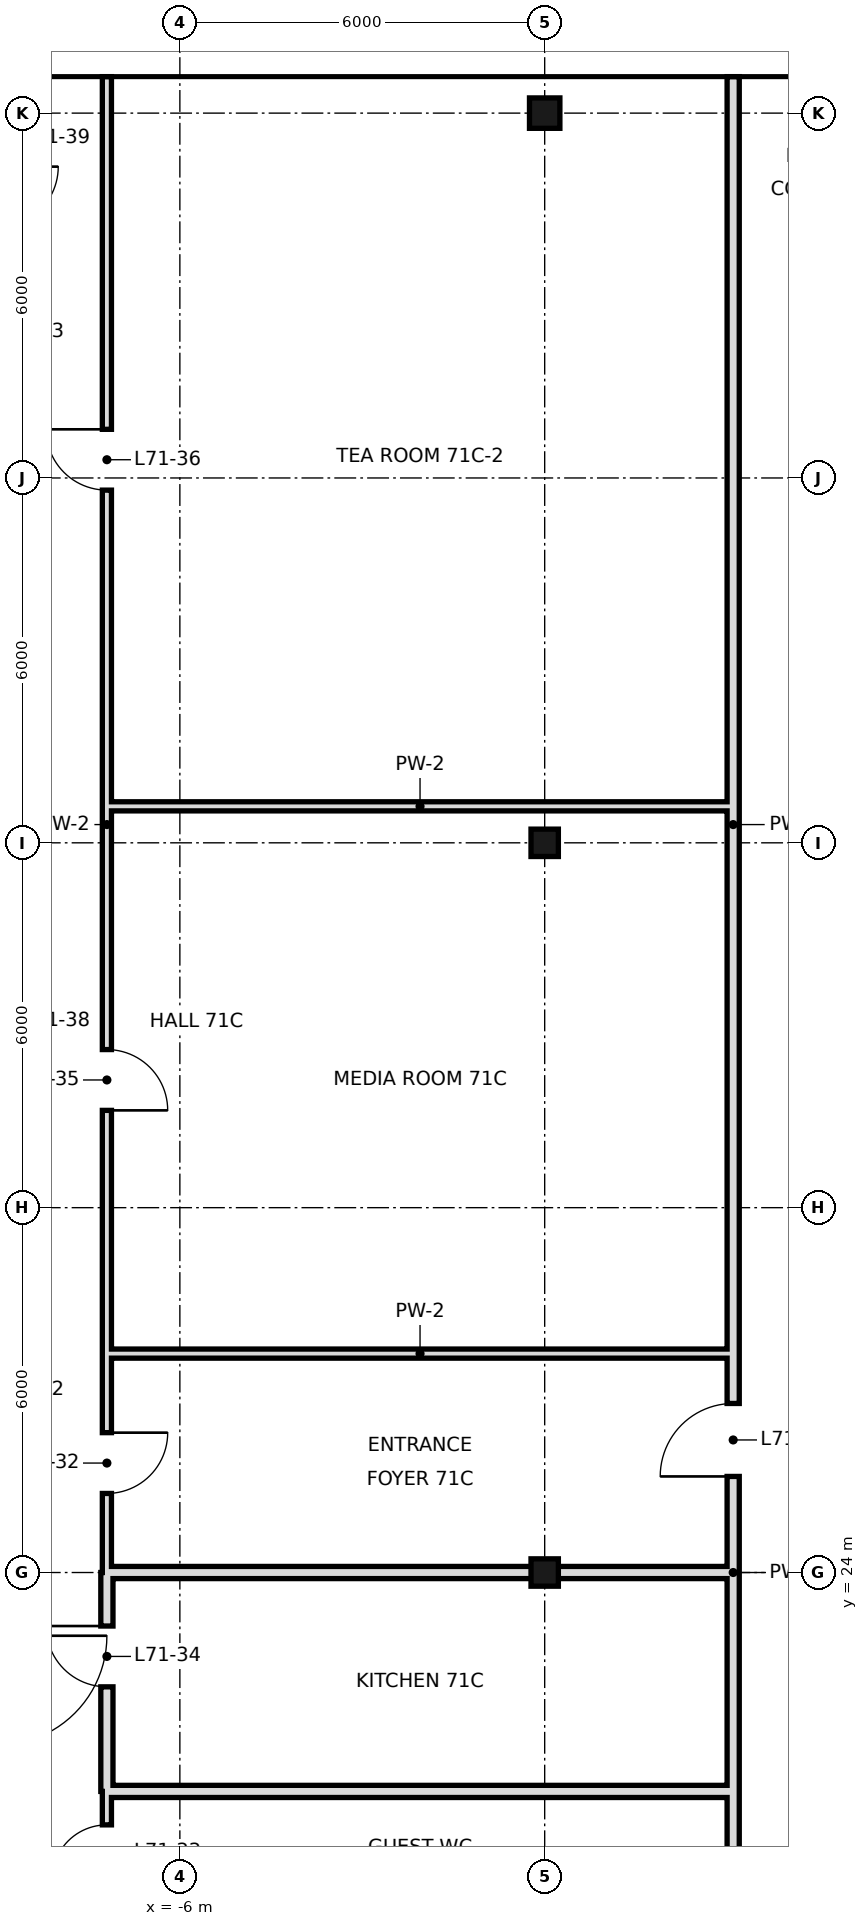
"""IFC4 building model, lengths in metres.
Left out: names, types, materials, properties, quantities, classifications, styles, units other than length and angle.
Written with IfcOpenShell. Run it as: python <this file> out.ifc"""

import sys

from ifc_helpers import new_model, si_unit, direction, frame, frame_2d, origin, origin_2d, place, context, subcontext, project, spatial, rectangle, hollow_rectangle, extrude, element, fill, save


model = new_model("IFC4")
c1 = context("Model", 3, precision=1e-05, world=origin(), true_north=direction((0.0, 1.0)))
c2 = subcontext(c1, "Body", "Model", "MODEL_VIEW")
j1 = project(units=[si_unit("LENGTHUNIT", "METRE"), si_unit("PLANEANGLEUNIT", "RADIAN")], contexts=[c1])
p1 = place(None, origin())
s1 = spatial("IfcSite", under=j1, at=p1, CompositionType="ELEMENT")
p2 = place(p1, origin())
s2 = spatial("IfcBuilding", under=s1, at=p2, CompositionType="ELEMENT")
p3 = place(p2, frame((0.0, 0.0, 301.6)))
s3 = spatial("IfcBuildingStorey", under=s2, at=p3, CompositionType="ELEMENT", Elevation=301.6)
for number, where, z_axis, x_axis in (
    (1, (0.0, 24.0, 0.0), (0.0, 0.0, 1.0), (1.0, 0.0, 0.0)),
    (2, (0.0, 36.0, 0.0), (0.0, 0.0, 1.0), (1.0, 0.0, 0.0)),
):
    element("IfcColumn", number, at=place(p3, frame(where, z_axis=z_axis, x_axis=x_axis)), inside=s3, PredefinedType="COLUMN", context=c2, shape_type="SweptSolid", body=[
        extrude(hollow_rectangle(XDim=0.45, YDim=0.45, WallThickness=0.022, at=origin_2d()), origin(), (0.0, 0.0, 1.0), 3.6),
    ])
p4 = place(p3, frame((0.0, 48.0, 0.0), z_axis=(0.0, 0.0, 1.0), x_axis=(1.0, 0.0, 0.0)))
e3 = element("IfcColumn", 3, at=p4, inside=s3, PredefinedType="COLUMN", context=c2, shape_type="SweptSolid", body=[
    extrude(hollow_rectangle(XDim=0.5, YDim=0.5, WallThickness=0.025, at=origin_2d()), origin(), (0.0, 0.0, 1.0), 3.6),
])
p5 = place(p3, frame((-7.2, 20.4, 0.0), z_axis=(0.0, 0.0, 1.0), x_axis=(0.0, 1.0, 0.0)))
e4 = element("IfcWall", 4, at=p5, inside=s3, PredefinedType="SOLIDWALL", context=c2, shape_type="SweptSolid", body=[
    extrude(rectangle(XDim=3.6, YDim=0.2, at=frame_2d((1.8, 0.0))), origin(), (0.0, 0.0, 1.0), 2.72),
])
p6 = place(p5, frame((1.72, 0.0, 0.0)))
e5 = element("IfcOpeningElement", 5, at=p6, cuts=e4, PredefinedType="OPENING", context=c2, shape_type="SweptSolid", body=[
    extrude(rectangle(XDim=1.0, YDim=2.4, at=frame_2d((0.5, 1.2))), frame((0.0, 0.11, 0.0), z_axis=(0.0, -1.0, 0.0), x_axis=(1.0, 0.0, 0.0)), (0.0, 0.0, 1.0), 0.22),
])
p7 = place(p3, frame((-7.2, 24.0, 0.0), z_axis=(0.0, 0.0, 1.0), x_axis=(0.0, 1.0, 0.0)))
e6 = element("IfcWall", 6, at=p7, inside=s3, PredefinedType="PARTITIONING", context=c2, shape_type="SweptSolid", body=[
    extrude(rectangle(XDim=24.6, YDim=0.15, at=frame_2d((12.3, 0.0))), origin(), (0.0, 0.0, 1.0), 3.42),
])
p8 = place(p7, frame((1.3, 0.0, 0.0)))
e7 = element("IfcOpeningElement", 7, at=p8, cuts=e6, PredefinedType="OPENING", context=c2, shape_type="SweptSolid", body=[
    extrude(rectangle(XDim=1.0, YDim=2.4, at=frame_2d((0.5, 1.2))), frame((0.0, 0.085, 0.0), z_axis=(0.0, -1.0, 0.0), x_axis=(1.0, 0.0, 0.0)), (0.0, 0.0, 1.0), 0.17),
])
p9 = place(p7, frame((7.6, 0.0, 0.0)))
e8 = element("IfcOpeningElement", 8, at=p9, cuts=e6, PredefinedType="OPENING", context=c2, shape_type="SweptSolid", body=[
    extrude(rectangle(XDim=1.0, YDim=2.4, at=frame_2d((0.5, 1.2))), frame((0.0, 0.085, 0.0), z_axis=(0.0, -1.0, 0.0), x_axis=(1.0, 0.0, 0.0)), (0.0, 0.0, 1.0), 0.17),
])
p10 = place(p7, frame((17.8, 0.0, 0.0)))
e9 = element("IfcOpeningElement", 9, at=p10, cuts=e6, PredefinedType="OPENING", context=c2, shape_type="SweptSolid", body=[
    extrude(rectangle(XDim=1.0, YDim=2.4, at=frame_2d((0.5, 1.2))), frame((0.0, 0.085, 0.0), z_axis=(0.0, -1.0, 0.0), x_axis=(1.0, 0.0, 0.0)), (0.0, 0.0, 1.0), 0.17),
])
p11 = place(p3, frame((-7.2, 18.0, 0.0), z_axis=(0.0, 0.0, 1.0), x_axis=(0.0, 1.0, 0.0)))
e10 = element("IfcWall", 10, at=p11, inside=s3, PredefinedType="PARTITIONING", context=c2, shape_type="SweptSolid", body=[
    extrude(rectangle(XDim=2.4, YDim=0.15, at=frame_2d((1.2, 0.0))), origin(), (0.0, 0.0, 1.0), 3.42),
])
p12 = place(p11, frame((0.95, 0.0, 0.0)))
e11 = element("IfcOpeningElement", 11, at=p12, cuts=e10, PredefinedType="OPENING", context=c2, shape_type="SweptSolid", body=[
    extrude(rectangle(XDim=0.9, YDim=2.4, at=frame_2d((0.45, 1.2))), frame((0.0, 0.085, 0.0), z_axis=(0.0, -1.0, 0.0), x_axis=(1.0, 0.0, 0.0)), (0.0, 0.0, 1.0), 0.17),
])
p13 = place(p3, frame((3.1, 18.7, 0.0), z_axis=(0.0, 0.0, 1.0), x_axis=(0.0, 1.0, 0.0)))
e12 = element("IfcWall", 12, at=p13, inside=s3, PredefinedType="SOLIDWALL", context=c2, shape_type="SweptSolid", body=[
    extrude(rectangle(XDim=1.7, YDim=0.2, at=frame_2d((0.85, 0.0))), origin(), (0.0, 0.0, 1.0), 3.42),
])
p14 = place(p3, frame((3.1, 24.0, 0.0), z_axis=(0.0, 0.0, 1.0), x_axis=(0.0, 1.0, 0.0)))
e13 = element("IfcWall", 13, at=p14, inside=s3, PredefinedType="SOLIDWALL", context=c2, shape_type="SweptSolid", body=[
    extrude(rectangle(XDim=24.6, YDim=0.2, at=frame_2d((12.3, 0.0))), origin(), (0.0, 0.0, 1.0), 2.72),
])
p15 = place(p14, frame((1.58, 0.0, 0.0)))
e14 = element("IfcOpeningElement", 14, at=p15, cuts=e13, PredefinedType="OPENING", context=c2, shape_type="SweptSolid", body=[
    extrude(rectangle(XDim=1.2, YDim=2.4, at=frame_2d((0.6, 1.2))), frame((0.0, 0.11, 0.0), z_axis=(0.0, -1.0, 0.0), x_axis=(1.0, 0.0, 0.0)), (0.0, 0.0, 1.0), 0.22),
])
p16 = place(p3, frame((3.1, 20.4, 0.0), z_axis=(0.0, 0.0, 1.0), x_axis=(0.0, 1.0, 0.0)))
e15 = element("IfcWall", 15, at=p16, inside=s3, PredefinedType="SOLIDWALL", context=c2, shape_type="SweptSolid", body=[
    extrude(rectangle(XDim=3.6, YDim=0.2, at=frame_2d((1.8, 0.0))), origin(), (0.0, 0.0, 1.0), 3.42),
])
for number, where, z_axis, x_axis in (
    (16, (-7.2, 20.4, 0.0), (0.0, 0.0, 1.0), (1.0, 0.0, 0.0)),
    (17, (-7.2, 24.0, 0.0), (0.0, 0.0, 1.0), (1.0, 0.0, 0.0)),
):
    element("IfcWall", number, at=place(p3, frame(where, z_axis=z_axis, x_axis=x_axis)), inside=s3, PredefinedType="SOLIDWALL", context=c2, shape_type="SweptSolid", body=[
        extrude(rectangle(XDim=10.3, YDim=0.2, at=frame_2d((5.15, 0.0))), origin(), (0.0, 0.0, 1.0), 2.72),
    ])
for number, where, z_axis, x_axis in (
    (18, (-7.2, 27.6, 0.0), (0.0, 0.0, 1.0), (1.0, 0.0, 0.0)),
    (19, (-7.2, 36.6, 0.0), (0.0, 0.0, 1.0), (1.0, 0.0, 0.0)),
):
    element("IfcWall", number, at=place(p3, frame(where, z_axis=z_axis, x_axis=x_axis)), inside=s3, PredefinedType="PARTITIONING", context=c2, shape_type="SweptSolid", body=[
        extrude(rectangle(XDim=10.3, YDim=0.15, at=frame_2d((5.15, 0.0))), origin(), (0.0, 0.0, 1.0), 3.42),
    ])
p17 = place(p8, origin())
e20 = element("IfcDoor", 20, at=p17, inside=s3, OperationType="SINGLE_SWING_RIGHT", PredefinedType="DOOR", context=c2, shape_type="SweptSolid", body=[
    extrude(rectangle(XDim=1.0, YDim=2.4, at=frame_2d((0.5, 1.2))), frame((0.0, 0.025, 0.0), z_axis=(0.0, -1.0, 0.0), x_axis=(1.0, 0.0, 0.0)), (0.0, 0.0, 1.0), 0.05),
])
fill(e7, e20)
p18 = place(p12, origin())
e21 = element("IfcDoor", 21, at=p18, inside=s3, OperationType="SINGLE_SWING_LEFT", PredefinedType="DOOR", context=c2, shape_type="SweptSolid", body=[
    extrude(rectangle(XDim=0.9, YDim=2.4, at=frame_2d((0.45, 1.2))), frame((0.0, 0.025, 0.0), z_axis=(0.0, -1.0, 0.0), x_axis=(1.0, 0.0, 0.0)), (0.0, 0.0, 1.0), 0.05),
])
fill(e11, e21)
p19 = place(p6, frame((1.0, 0.0, 0.0), z_axis=(0.0, 0.0, 1.0), x_axis=(-1.0, 0.0, 0.0)))
e22 = element("IfcDoor", 22, at=p19, inside=s3, OperationType="SINGLE_SWING_LEFT", PredefinedType="DOOR", context=c2, shape_type="SweptSolid", body=[
    extrude(rectangle(XDim=1.0, YDim=2.4, at=frame_2d((0.5, 1.2))), frame((0.0, 0.025, 0.0), z_axis=(0.0, -1.0, 0.0), x_axis=(1.0, 0.0, 0.0)), (0.0, 0.0, 1.0), 0.05),
])
fill(e5, e22)
p20 = place(p9, frame((1.0, 0.0, 0.0), z_axis=(0.0, 0.0, 1.0), x_axis=(-1.0, 0.0, 0.0)))
e23 = element("IfcDoor", 23, at=p20, inside=s3, OperationType="SINGLE_SWING_RIGHT", PredefinedType="DOOR", context=c2, shape_type="SweptSolid", body=[
    extrude(rectangle(XDim=1.0, YDim=2.4, at=frame_2d((0.5, 1.2))), frame((0.0, 0.025, 0.0), z_axis=(0.0, -1.0, 0.0), x_axis=(1.0, 0.0, 0.0)), (0.0, 0.0, 1.0), 0.05),
])
fill(e8, e23)
p21 = place(p10, frame((1.0, 0.0, 0.0), z_axis=(0.0, 0.0, 1.0), x_axis=(-1.0, 0.0, 0.0)))
e24 = element("IfcDoor", 24, at=p21, inside=s3, OperationType="SINGLE_SWING_LEFT", PredefinedType="DOOR", context=c2, shape_type="SweptSolid", body=[
    extrude(rectangle(XDim=1.0, YDim=2.4, at=frame_2d((0.5, 1.2))), frame((0.0, 0.025, 0.0), z_axis=(0.0, -1.0, 0.0), x_axis=(1.0, 0.0, 0.0)), (0.0, 0.0, 1.0), 0.05),
])
fill(e9, e24)
p22 = place(p15, origin())
e25 = element("IfcDoor", 25, at=p22, inside=s3, OperationType="SINGLE_SWING_LEFT", PredefinedType="DOOR", context=c2, shape_type="SweptSolid", body=[
    extrude(rectangle(XDim=1.2, YDim=2.4, at=frame_2d((0.6, 1.2))), frame((0.0, 0.025, 0.0), z_axis=(0.0, -1.0, 0.0), x_axis=(1.0, 0.0, 0.0)), (0.0, 0.0, 1.0), 0.05),
])
fill(e14, e25)
save(model, sys.argv[1])
